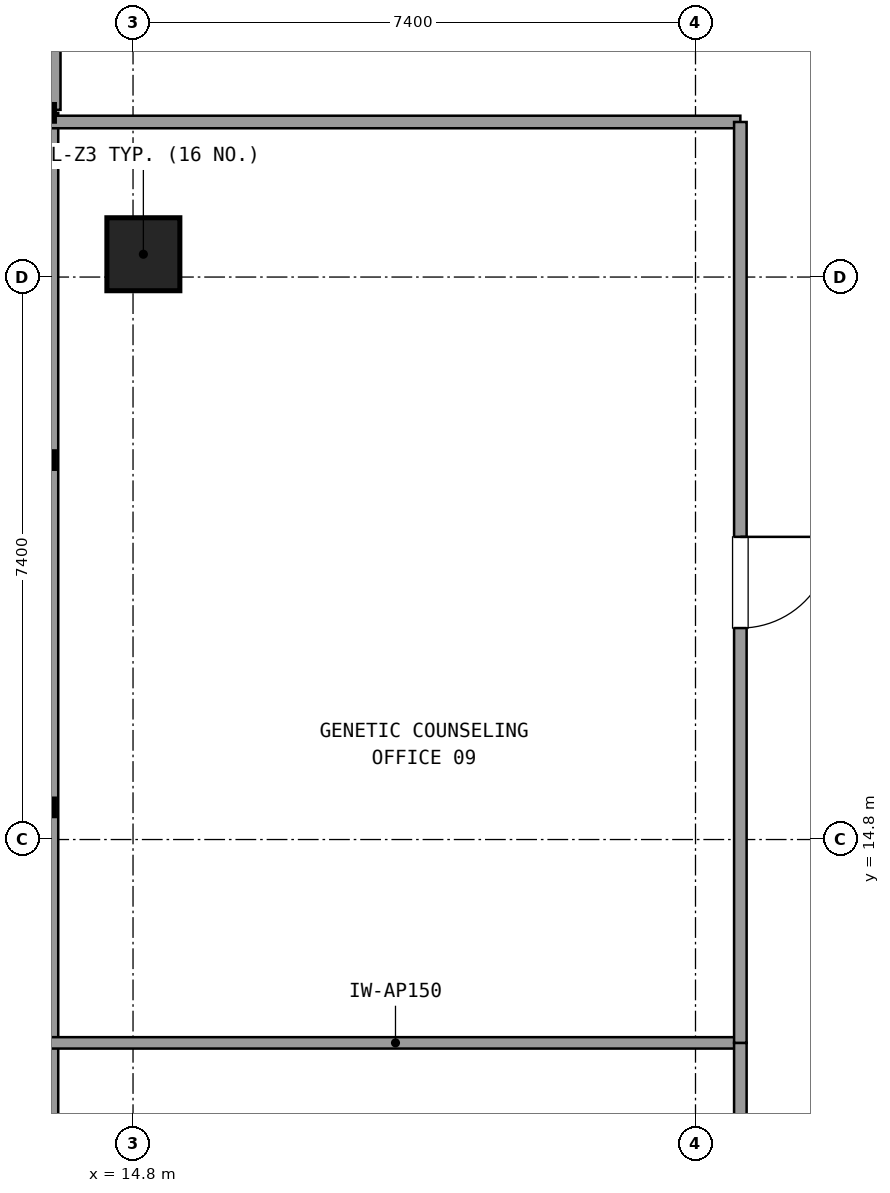
"""IFC4 building model, lengths in metres.
Left out: names, types, materials, properties, quantities, classifications, styles, units other than length and angle.
Written with IfcOpenShell. Run it as: python <this file> out.ifc"""

import sys

from ifc_helpers import new_model, si_unit, direction, frame, frame_2d, origin, origin_2d, place, context, subcontext, project, spatial, rectangle, extrude, element, fill, save


model = new_model("IFC4")
c1 = context("Model", 3, precision=1e-05, world=origin(), true_north=direction((0.0, 1.0)))
c2 = subcontext(c1, "Body", "Model", "MODEL_VIEW")
j1 = project(units=[si_unit("LENGTHUNIT", "METRE"), si_unit("PLANEANGLEUNIT", "RADIAN")], contexts=[c1])
p1 = place(None, origin())
s1 = spatial("IfcSite", under=j1, at=p1, CompositionType="ELEMENT")
p2 = place(p1, origin())
s2 = spatial("IfcBuilding", under=s1, at=p2, CompositionType="ELEMENT")
p3 = place(p2, frame((0.0, 0.0, 163.62)))
s3 = spatial("IfcBuildingStorey", under=s2, at=p3, CompositionType="ELEMENT", Elevation=163.62)
p4 = place(p3, frame((14.936, 22.5, 0.0), z_axis=(0.0, 0.0, 1.0), x_axis=(1.0, 0.0, 0.0)))
e1 = element("IfcColumn", 1, at=p4, inside=s3, PredefinedType="COLUMN", context=c2, shape_type="SweptSolid", body=[
    extrude(rectangle(XDim=0.96, YDim=0.96, at=origin_2d()), origin(), (0.0, 0.0, 1.0), 3.6),
])
p5 = place(p3, frame((13.696, 27.4, 0.0), z_axis=(0.0, 0.0, 1.0), x_axis=(0.0, -1.0, 0.0)))
e2 = element("IfcWall", 2, at=p5, inside=s3, PredefinedType="SOLIDWALL", context=c2, shape_type="SweptSolid", body=[
    extrude(rectangle(XDim=3.0, YDim=0.3, at=frame_2d((1.5, 0.0))), origin(), (0.0, 0.0, 1.0), 2.67),
])
p6 = place(p5, frame((0.9, 0.0, 0.0)))
e3 = element("IfcOpeningElement", 3, at=p6, cuts=e2, PredefinedType="OPENING", context=c2, shape_type="SweptSolid", body=[
    extrude(rectangle(XDim=1.2, YDim=2.2, at=frame_2d((0.6, 1.1))), frame((0.0, 0.16, 0.0), z_axis=(0.0, -1.0, 0.0), x_axis=(1.0, 0.0, 0.0)), (0.0, 0.0, 1.0), 0.32),
])
p7 = place(p3, frame((13.696, 24.36, 0.0), z_axis=(0.0, 0.0, 1.0), x_axis=(0.0, -1.0, 0.0)))
e4 = element("IfcWall", 4, at=p7, inside=s3, PredefinedType="SOLIDWALL", context=c2, shape_type="SweptSolid", body=[
    extrude(rectangle(XDim=13.705, YDim=0.24, at=frame_2d((6.853, 0.0))), origin(), (0.0, 0.0, 1.0), 0.85),
])
p8 = place(p3, frame((13.716, 24.24, 0.0), z_axis=(0.0, 0.0, 1.0), x_axis=(1.0, 0.0, 0.0)))
e5 = element("IfcWall", 5, at=p8, inside=s3, PredefinedType="PARTITIONING", context=c2, shape_type="SweptSolid", body=[
    extrude(rectangle(XDim=9.074, YDim=0.165, at=frame_2d((4.537, 0.0))), origin(), (0.0, 0.0, 1.0), 2.61),
])
p9 = place(p3, frame((22.79, 12.125, 0.0), z_axis=(0.0, 0.0, 1.0), x_axis=(-1.0, 0.0, 0.0)))
e6 = element("IfcWall", 6, at=p9, inside=s3, PredefinedType="PARTITIONING", context=c2, shape_type="SweptSolid", body=[
    extrude(rectangle(XDim=9.074, YDim=0.15, at=frame_2d((4.537, 0.0))), origin(), (0.0, 0.0, 1.0), 2.61),
])
p10 = place(p3, frame((22.79, 4.7, 0.0), z_axis=(0.0, 0.0, 1.0), x_axis=(0.0, 1.0, 0.0)))
e7 = element("IfcWall", 7, at=p10, inside=s3, PredefinedType="PARTITIONING", context=c2, shape_type="SweptSolid", body=[
    extrude(rectangle(XDim=7.425, YDim=0.165, at=frame_2d((3.712, 0.0))), origin(), (0.0, 0.0, 1.0), 2.61),
])
p11 = place(p10, frame((3.112, 0.0, 0.0)))
e8 = element("IfcOpeningElement", 8, at=p11, cuts=e7, PredefinedType="OPENING", context=c2, shape_type="SweptSolid", body=[
    extrude(rectangle(XDim=1.2, YDim=2.15, at=frame_2d((0.6, 1.075))), frame((0.0, 0.093, 0.0), z_axis=(0.0, -1.0, 0.0), x_axis=(1.0, 0.0, 0.0)), (0.0, 0.0, 1.0), 0.185),
])
p12 = place(p3, frame((22.79, 12.125, 0.0), z_axis=(0.0, 0.0, 1.0), x_axis=(0.0, 1.0, 0.0)))
e9 = element("IfcWall", 9, at=p12, inside=s3, PredefinedType="PARTITIONING", context=c2, shape_type="SweptSolid", body=[
    extrude(rectangle(XDim=12.115, YDim=0.165, at=frame_2d((6.058, 0.0))), origin(), (0.0, 0.0, 1.0), 2.61),
])
p13 = place(p12, frame((5.457, 0.0, 0.0)))
e10 = element("IfcOpeningElement", 10, at=p13, cuts=e9, PredefinedType="OPENING", context=c2, shape_type="SweptSolid", body=[
    extrude(rectangle(XDim=1.2, YDim=2.15, at=frame_2d((0.6, 1.075))), frame((0.0, 0.093, 0.0), z_axis=(0.0, -1.0, 0.0), x_axis=(1.0, 0.0, 0.0)), (0.0, 0.0, 1.0), 0.185),
])
p14 = place(p13, frame((1.2, 0.0, 0.0), z_axis=(0.0, 0.0, 1.0), x_axis=(-1.0, 0.0, 0.0)))
e11 = element("IfcDoor", 11, at=p14, inside=s3, OperationType="SINGLE_SWING_RIGHT", PredefinedType="DOOR", context=c2, shape_type="SweptSolid", body=[
    extrude(rectangle(XDim=1.2, YDim=2.15, at=frame_2d((0.6, 1.075))), frame((0.0, 0.025, 0.0), z_axis=(0.0, -1.0, 0.0), x_axis=(1.0, 0.0, 0.0)), (0.0, 0.0, 1.0), 0.05),
])
fill(e10, e11)
save(model, sys.argv[1])
